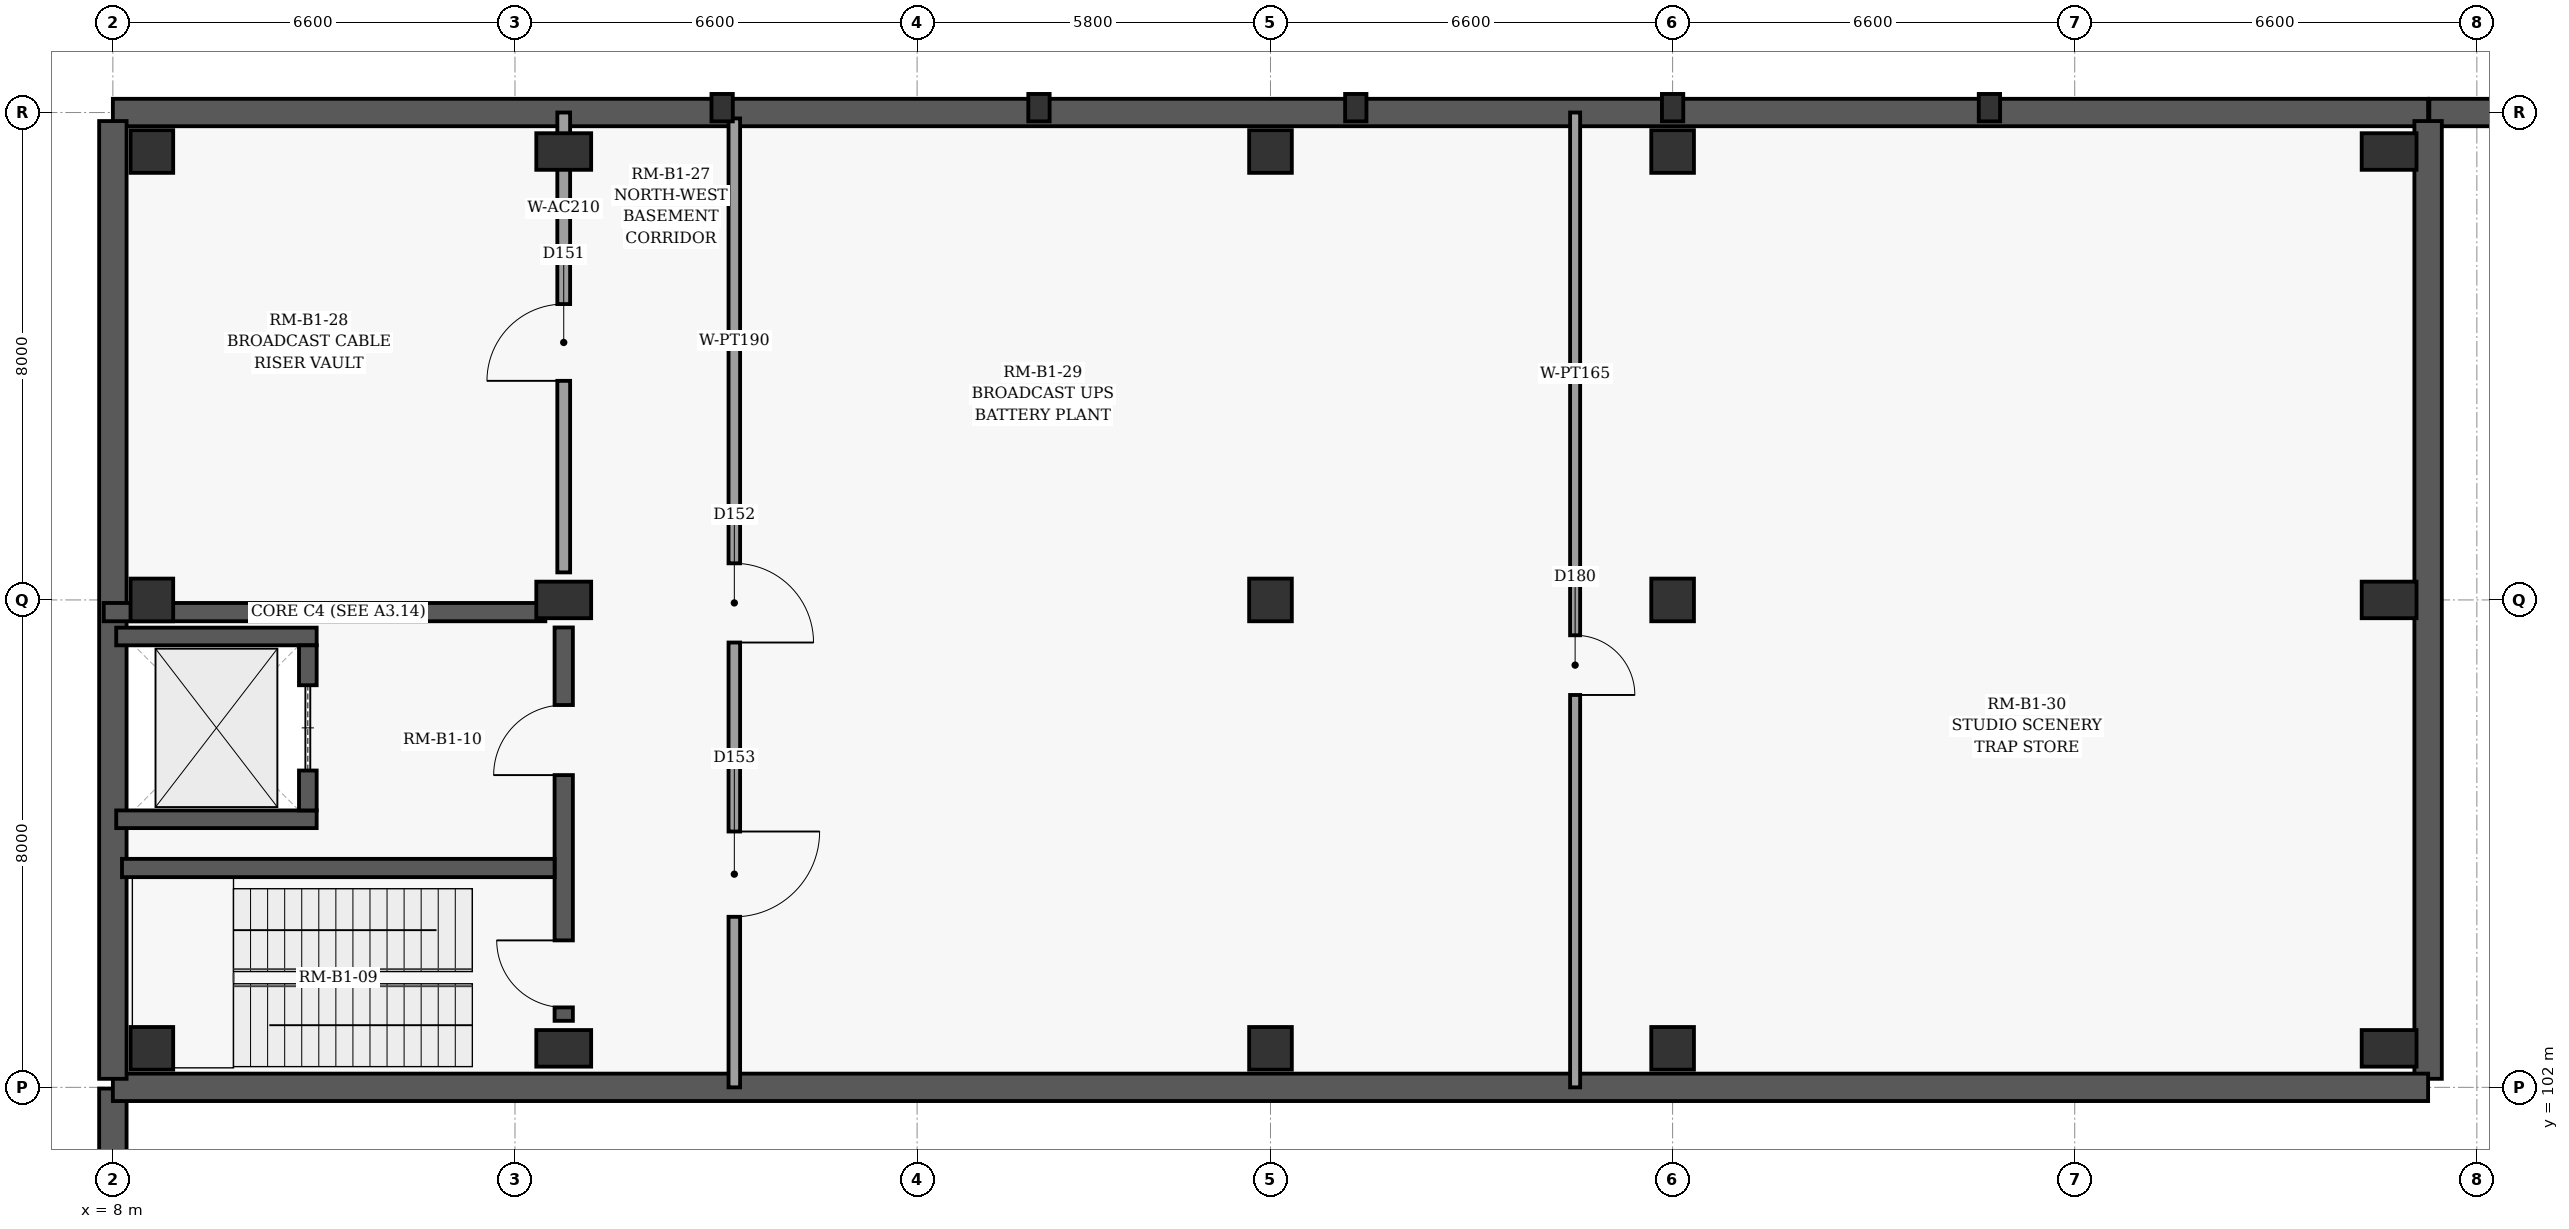
"""IFC4 building model, lengths in metres.
Left out: names, types, materials, properties, quantities, classifications, styles, units other than length and angle.
Written with IfcOpenShell. Run it as: python <this file> out.ifc"""

import sys

from ifc_helpers import new_model, si_unit, direction, frame, frame_2d, origin, origin_2d, place, context, subcontext, project, spatial, rectangle, extrude, element, fill, save


model = new_model("IFC4")
c1 = context("Model", 3, precision=1e-05, world=origin(), true_north=direction((0.0, 1.0)))
c2 = subcontext(c1, "Body", "Model", "MODEL_VIEW")
j1 = project(units=[si_unit("LENGTHUNIT", "METRE"), si_unit("PLANEANGLEUNIT", "RADIAN")], contexts=[c1])
p1 = place(None, origin())
s1 = spatial("IfcSite", under=j1, at=p1, CompositionType="ELEMENT")
p2 = place(p1, origin())
s2 = spatial("IfcBuilding", under=s1, at=p2, CompositionType="ELEMENT")
p3 = place(p2, frame((0.0, 0.0, -4.8)))
s3 = spatial("IfcBuildingStorey", under=s2, at=p3, CompositionType="ELEMENT", Elevation=-4.8)
for number, where, z_axis, x_axis in (
    (1, (8.64, 102.64, 0.0), (0.0, 0.0, 1.0), (1.0, 0.0, 0.0)),
    (2, (8.64, 110.0, 0.0), (0.0, 0.0, 1.0), (1.0, 0.0, 0.0)),
    (3, (8.64, 117.36, 0.0), (0.0, 0.0, 1.0), (1.0, 0.0, 0.0)),
):
    element("IfcColumn", number, at=place(p3, frame(where, z_axis=z_axis, x_axis=x_axis)), inside=s3, PredefinedType="COLUMN", context=c2, shape_type="SweptSolid", body=[
        extrude(rectangle(XDim=0.7, YDim=0.7, at=origin_2d()), origin(), (0.0, 0.0, 1.0), 4.8),
    ])
for number, where, z_axis, x_axis in (
    (4, (15.4, 102.64, 0.0), (0.0, 0.0, 1.0), (1.0, 0.0, 0.0)),
    (5, (15.4, 110.0, 0.0), (0.0, 0.0, 1.0), (1.0, 0.0, 0.0)),
    (6, (15.4, 117.36, 0.0), (0.0, 0.0, 1.0), (1.0, 0.0, 0.0)),
):
    element("IfcColumn", number, at=place(p3, frame(where, z_axis=z_axis, x_axis=x_axis)), inside=s3, PredefinedType="COLUMN", context=c2, shape_type="SweptSolid", body=[
        extrude(rectangle(XDim=0.6, YDim=0.9, at=origin_2d()), origin(), (0.0, 0.0, 1.0), 4.8),
    ])
for number, where, z_axis, x_axis in (
    (7, (27.0, 102.64, 0.0), (0.0, 0.0, 1.0), (1.0, 0.0, 0.0)),
    (8, (27.0, 110.0, 0.0), (0.0, 0.0, 1.0), (1.0, 0.0, 0.0)),
    (9, (27.0, 117.36, 0.0), (0.0, 0.0, 1.0), (1.0, 0.0, 0.0)),
    (10, (33.6, 102.64, 0.0), (0.0, 0.0, 1.0), (1.0, 0.0, 0.0)),
    (11, (33.6, 110.0, 0.0), (0.0, 0.0, 1.0), (1.0, 0.0, 0.0)),
    (12, (33.6, 117.36, 0.0), (0.0, 0.0, 1.0), (1.0, 0.0, 0.0)),
):
    element("IfcColumn", number, at=place(p3, frame(where, z_axis=z_axis, x_axis=x_axis)), inside=s3, PredefinedType="COLUMN", context=c2, shape_type="SweptSolid", body=[
        extrude(rectangle(XDim=0.7, YDim=0.7, at=origin_2d()), origin(), (0.0, 0.0, 1.0), 4.8),
    ])
for number, where, z_axis, x_axis in (
    (13, (45.36, 102.64, 0.0), (0.0, 0.0, 1.0), (1.0, 0.0, 0.0)),
    (14, (45.36, 110.0, 0.0), (0.0, 0.0, 1.0), (1.0, 0.0, 0.0)),
    (15, (45.36, 117.36, 0.0), (0.0, 0.0, 1.0), (1.0, 0.0, 0.0)),
):
    element("IfcColumn", number, at=place(p3, frame(where, z_axis=z_axis, x_axis=x_axis)), inside=s3, PredefinedType="COLUMN", context=c2, shape_type="SweptSolid", body=[
        extrude(rectangle(XDim=0.6, YDim=0.9, at=origin_2d()), origin(), (0.0, 0.0, 1.0), 4.8),
    ])
for number, where, z_axis, x_axis in (
    (16, (18.0, 118.08, -0.425), (0.0, 0.0, 1.0), (0.0, 1.0, 0.0)),
    (17, (23.2, 118.08, -0.425), (0.0, 0.0, 1.0), (0.0, 1.0, 0.0)),
    (18, (28.4, 118.08, -0.425), (0.0, 0.0, 1.0), (0.0, 1.0, 0.0)),
    (19, (33.6, 118.08, -0.425), (0.0, 0.0, 1.0), (0.0, 1.0, 0.0)),
    (20, (38.8, 118.08, -0.425), (0.0, 0.0, 1.0), (0.0, 1.0, 0.0)),
):
    element("IfcColumn", number, at=place(p3, frame(where, z_axis=z_axis, x_axis=x_axis)), inside=s3, PredefinedType="PILASTER", context=c2, shape_type="SweptSolid", body=[
        extrude(rectangle(XDim=0.35, YDim=0.45, at=origin_2d()), origin(), (0.0, 0.0, 1.0), 5.225),
    ])
p4 = place(p3, frame((8.0, 94.02, 0.0), z_axis=(0.0, 0.0, 1.0), x_axis=(0.0, 1.0, 0.0)))
e21 = element("IfcWall", 21, at=p4, inside=s3, PredefinedType="USERDEFINED", context=c2, shape_type="SweptSolid", body=[
    extrude(rectangle(XDim=7.96, YDim=0.45, at=frame_2d((3.98, 0.0))), origin(), (0.0, 0.0, 1.0), 4.53),
])
p5 = place(p3, frame((46.02, 118.0, 0.0), z_axis=(0.0, 0.0, 1.0), x_axis=(1.0, 0.0, 0.0)))
e22 = element("IfcWall", 22, at=p5, inside=s3, PredefinedType="USERDEFINED", context=c2, shape_type="SweptSolid", body=[
    extrude(rectangle(XDim=48.76, YDim=0.45, at=frame_2d((24.38, 0.0))), origin(), (0.0, 0.0, 1.0), 4.53),
])
p6 = place(p3, frame((8.0, 118.0, 0.0), z_axis=(0.0, 0.0, 1.0), x_axis=(1.0, 0.0, 0.0)))
e23 = element("IfcWall", 23, at=p6, inside=s3, PredefinedType="USERDEFINED", context=c2, shape_type="SweptSolid", body=[
    extrude(rectangle(XDim=38.0, YDim=0.45, at=frame_2d((19.0, 0.0))), origin(), (0.0, 0.0, 1.0), 4.475),
])
p7 = place(p3, frame((46.0, 117.86, 0.0), z_axis=(0.0, 0.0, 1.0), x_axis=(0.0, -1.0, 0.0)))
e24 = element("IfcWall", 24, at=p7, inside=s3, PredefinedType="USERDEFINED", context=c2, shape_type="SweptSolid", body=[
    extrude(rectangle(XDim=15.72, YDim=0.45, at=frame_2d((7.86, 0.0))), origin(), (0.0, 0.0, 1.0), 4.475),
])
p8 = place(p3, frame((46.0, 102.0, 0.0), z_axis=(0.0, 0.0, 1.0), x_axis=(-1.0, 0.0, 0.0)))
e25 = element("IfcWall", 25, at=p8, inside=s3, PredefinedType="USERDEFINED", context=c2, shape_type="SweptSolid", body=[
    extrude(rectangle(XDim=38.0, YDim=0.45, at=frame_2d((19.0, 0.0))), origin(), (0.0, 0.0, 1.0), 4.475),
])
p9 = place(p3, frame((8.0, 102.14, 0.0), z_axis=(0.0, 0.0, 1.0), x_axis=(0.0, 1.0, 0.0)))
e26 = element("IfcWall", 26, at=p9, inside=s3, PredefinedType="USERDEFINED", context=c2, shape_type="SweptSolid", body=[
    extrude(rectangle(XDim=15.72, YDim=0.45, at=frame_2d((7.86, 0.0))), origin(), (0.0, 0.0, 1.0), 4.475),
])
p10 = place(p3, frame((7.85, 109.8, 0.0), z_axis=(0.0, 0.0, 1.0), x_axis=(1.0, 0.0, 0.0)))
e27 = element("IfcWall", 27, at=p10, inside=s3, PredefinedType="SHEAR", context=c2, shape_type="SweptSolid", body=[
    extrude(rectangle(XDim=7.248, YDim=0.3, at=frame_2d((3.624, 0.0))), origin(), (0.0, 0.0, 1.0), 4.475),
])
p11 = place(p3, frame((15.4, 103.092, 0.0), z_axis=(0.0, 0.0, 1.0), x_axis=(0.0, 1.0, 0.0)))
e28 = element("IfcWall", 28, at=p11, inside=s3, PredefinedType="SHEAR", context=c2, shape_type="SweptSolid", body=[
    extrude(rectangle(XDim=6.456, YDim=0.3, at=frame_2d((3.228, 0.0))), origin(), (0.0, 0.0, 1.0), 4.475),
])
p12 = place(p11, frame((0.22, 0.0, 0.0)))
e29 = element("IfcOpeningElement", 29, at=p12, cuts=e28, PredefinedType="OPENING", context=c2, shape_type="SweptSolid", body=[
    extrude(rectangle(XDim=1.1, YDim=2.15, at=frame_2d((0.55, 1.075))), frame((0.0, 0.16, 0.0), z_axis=(0.0, -1.0, 0.0), x_axis=(1.0, 0.0, 0.0)), (0.0, 0.0, 1.0), 0.32),
])
p13 = place(p11, frame((4.033, 0.0, 0.0)))
e30 = element("IfcOpeningElement", 30, at=p13, cuts=e28, PredefinedType="OPENING", context=c2, shape_type="SweptSolid", body=[
    extrude(rectangle(XDim=1.15, YDim=2.2, at=frame_2d((0.575, 1.1))), frame((0.0, 0.16, 0.0), z_axis=(0.0, -1.0, 0.0), x_axis=(1.0, 0.0, 0.0)), (0.0, 0.0, 1.0), 0.32),
])
p14 = place(p3, frame((8.15, 105.6, 0.0), z_axis=(0.0, 0.0, 1.0), x_axis=(1.0, 0.0, 0.0)))
e31 = element("IfcWall", 31, at=p14, inside=s3, PredefinedType="SHEAR", context=c2, shape_type="SweptSolid", body=[
    extrude(rectangle(XDim=7.1, YDim=0.3, at=frame_2d((3.55, 0.0))), origin(), (0.0, 0.0, 1.0), 4.475),
])
for number, where, z_axis, x_axis in (
    (32, (8.055, 106.4, 0.0), (0.0, 0.0, 1.0), (1.0, 0.0, 0.0)),
    (33, (8.055, 109.4, 0.0), (0.0, 0.0, 1.0), (1.0, 0.0, 0.0)),
):
    element("IfcWall", number, at=place(p3, frame(where, z_axis=z_axis, x_axis=x_axis)), inside=s3, PredefinedType="SHEAR", context=c2, shape_type="SweptSolid", body=[
        extrude(rectangle(XDim=3.29, YDim=0.29, at=frame_2d((1.645, 0.0))), origin(), (0.0, 0.0, 1.0), 4.475),
    ])
p15 = place(p3, frame((11.2, 106.545, 0.0), z_axis=(0.0, 0.0, 1.0), x_axis=(0.0, 1.0, 0.0)))
e34 = element("IfcWall", 34, at=p15, inside=s3, PredefinedType="SHEAR", context=c2, shape_type="SweptSolid", body=[
    extrude(rectangle(XDim=2.71, YDim=0.29, at=frame_2d((1.355, 0.0))), origin(), (0.0, 0.0, 1.0), 4.475),
])
p16 = place(p15, frame((0.655, 0.0, 0.0)))
e35 = element("IfcOpeningElement", 35, at=p16, cuts=e34, PredefinedType="OPENING", context=c2, shape_type="SweptSolid", body=[
    extrude(rectangle(XDim=1.4, YDim=2.25, at=frame_2d((0.7, 1.125))), frame((0.0, 0.155, 0.0), z_axis=(0.0, -1.0, 0.0), x_axis=(1.0, 0.0, 0.0)), (0.0, 0.0, 1.0), 0.31),
])
p17 = place(p3, frame((15.4, 110.452, 0.0), z_axis=(0.0, 0.0, 1.0), x_axis=(0.0, 1.0, 0.0)))
e36 = element("IfcWall", 36, at=p17, inside=s3, PredefinedType="PARTITIONING", context=c2, shape_type="SweptSolid", body=[
    extrude(rectangle(XDim=7.548, YDim=0.21, at=frame_2d((3.774, 0.0))), origin(), (0.0, 0.0, 1.0), 3.725),
])
p18 = place(p17, frame((3.144, 0.0, 0.0)))
e37 = element("IfcOpeningElement", 37, at=p18, cuts=e36, PredefinedType="OPENING", context=c2, shape_type="SweptSolid", body=[
    extrude(rectangle(XDim=1.26, YDim=2.2, at=frame_2d((0.63, 1.1))), frame((0.0, 0.115, 0.0), z_axis=(0.0, -1.0, 0.0), x_axis=(1.0, 0.0, 0.0)), (0.0, 0.0, 1.0), 0.23),
])
p19 = place(p3, frame((18.2, 117.903, 0.0), z_axis=(0.0, 0.0, 1.0), x_axis=(0.0, -1.0, 0.0)))
e38 = element("IfcWall", 38, at=p19, inside=s3, PredefinedType="PARTITIONING", context=c2, shape_type="SweptSolid", body=[
    extrude(rectangle(XDim=15.903, YDim=0.19, at=frame_2d((7.952, 0.0))), origin(), (0.0, 0.0, 1.0), 4.475),
])
p20 = place(p19, frame((7.302, 0.0, 0.0)))
e39 = element("IfcOpeningElement", 39, at=p20, cuts=e38, PredefinedType="OPENING", context=c2, shape_type="SweptSolid", body=[
    extrude(rectangle(XDim=1.3, YDim=2.2, at=frame_2d((0.65, 1.1))), frame((0.0, 0.105, 0.0), z_axis=(0.0, -1.0, 0.0), x_axis=(1.0, 0.0, 0.0)), (0.0, 0.0, 1.0), 0.21),
])
p21 = place(p19, frame((11.704, 0.0, 0.0)))
e40 = element("IfcOpeningElement", 40, at=p21, cuts=e38, PredefinedType="OPENING", context=c2, shape_type="SweptSolid", body=[
    extrude(rectangle(XDim=1.4, YDim=2.25, at=frame_2d((0.7, 1.125))), frame((0.0, 0.105, 0.0), z_axis=(0.0, -1.0, 0.0), x_axis=(1.0, 0.0, 0.0)), (0.0, 0.0, 1.0), 0.21),
])
p22 = place(p3, frame((32.0, 118.0, 0.0), z_axis=(0.0, 0.0, 1.0), x_axis=(0.0, -1.0, 0.0)))
e41 = element("IfcWall", 41, at=p22, inside=s3, PredefinedType="PARTITIONING", context=c2, shape_type="SweptSolid", body=[
    extrude(rectangle(XDim=16.0, YDim=0.165, at=frame_2d((8.0, 0.0))), origin(), (0.0, 0.0, 1.0), 4.475),
])
p23 = place(p22, frame((8.58, 0.0, 0.0)))
e42 = element("IfcOpeningElement", 42, at=p23, cuts=e41, PredefinedType="OPENING", context=c2, shape_type="SweptSolid", body=[
    extrude(rectangle(XDim=0.98, YDim=2.1, at=frame_2d((0.49, 1.05))), frame((0.0, 0.093, 0.0), z_axis=(0.0, -1.0, 0.0), x_axis=(1.0, 0.0, 0.0)), (0.0, 0.0, 1.0), 0.185),
])
p24 = place(p12, origin())
e43 = element("IfcDoor", 43, at=p24, inside=s3, OperationType="SINGLE_SWING_RIGHT", PredefinedType="DOOR", context=c2, shape_type="SweptSolid", body=[
    extrude(rectangle(XDim=1.1, YDim=2.15, at=frame_2d((0.55, 1.075))), frame((0.0, 0.025, 0.0), z_axis=(0.0, -1.0, 0.0), x_axis=(1.0, 0.0, 0.0)), (0.0, 0.0, 1.0), 0.05),
])
fill(e29, e43)
p25 = place(p13, origin())
e44 = element("IfcDoor", 44, at=p25, inside=s3, OperationType="SINGLE_SWING_LEFT", PredefinedType="DOOR", context=c2, shape_type="SweptSolid", body=[
    extrude(rectangle(XDim=1.15, YDim=2.2, at=frame_2d((0.575, 1.1))), frame((0.0, 0.025, 0.0), z_axis=(0.0, -1.0, 0.0), x_axis=(1.0, 0.0, 0.0)), (0.0, 0.0, 1.0), 0.05),
])
fill(e30, e44)
p26 = place(p16, origin())
e45 = element("IfcDoor", 45, at=p26, inside=s3, OperationType="SLIDING_TO_LEFT", PredefinedType="DOOR", context=c2, shape_type="SweptSolid", body=[
    extrude(rectangle(XDim=1.4, YDim=2.25, at=frame_2d((0.7, 1.125))), frame((0.0, 0.025, 0.0), z_axis=(0.0, -1.0, 0.0), x_axis=(1.0, 0.0, 0.0)), (0.0, 0.0, 1.0), 0.05),
])
fill(e35, e45)
p27 = place(p18, origin())
e46 = element("IfcDoor", 46, at=p27, inside=s3, OperationType="SINGLE_SWING_LEFT", PredefinedType="DOOR", context=c2, shape_type="SweptSolid", body=[
    extrude(rectangle(XDim=1.26, YDim=2.2, at=frame_2d((0.63, 1.1))), frame((0.0, 0.025, 0.0), z_axis=(0.0, -1.0, 0.0), x_axis=(1.0, 0.0, 0.0)), (0.0, 0.0, 1.0), 0.05),
])
fill(e37, e46)
p28 = place(p20, origin())
e47 = element("IfcDoor", 47, at=p28, inside=s3, OperationType="SINGLE_SWING_RIGHT", PredefinedType="DOOR", context=c2, shape_type="SweptSolid", body=[
    extrude(rectangle(XDim=1.3, YDim=2.2, at=frame_2d((0.65, 1.1))), frame((0.0, 0.025, 0.0), z_axis=(0.0, -1.0, 0.0), x_axis=(1.0, 0.0, 0.0)), (0.0, 0.0, 1.0), 0.05),
])
fill(e39, e47)
p29 = place(p21, origin())
e48 = element("IfcDoor", 48, at=p29, inside=s3, OperationType="SINGLE_SWING_LEFT", PredefinedType="DOOR", context=c2, shape_type="SweptSolid", body=[
    extrude(rectangle(XDim=1.4, YDim=2.25, at=frame_2d((0.7, 1.125))), frame((0.0, 0.025, 0.0), z_axis=(0.0, -1.0, 0.0), x_axis=(1.0, 0.0, 0.0)), (0.0, 0.0, 1.0), 0.05),
])
fill(e40, e48)
p30 = place(p23, origin())
e49 = element("IfcDoor", 49, at=p30, inside=s3, OperationType="SINGLE_SWING_RIGHT", PredefinedType="DOOR", context=c2, shape_type="SweptSolid", body=[
    extrude(rectangle(XDim=0.98, YDim=2.1, at=frame_2d((0.49, 1.05))), frame((0.0, 0.025, 0.0), z_axis=(0.0, -1.0, 0.0), x_axis=(1.0, 0.0, 0.0)), (0.0, 0.0, 1.0), 0.05),
])
fill(e42, e49)
save(model, sys.argv[1])
